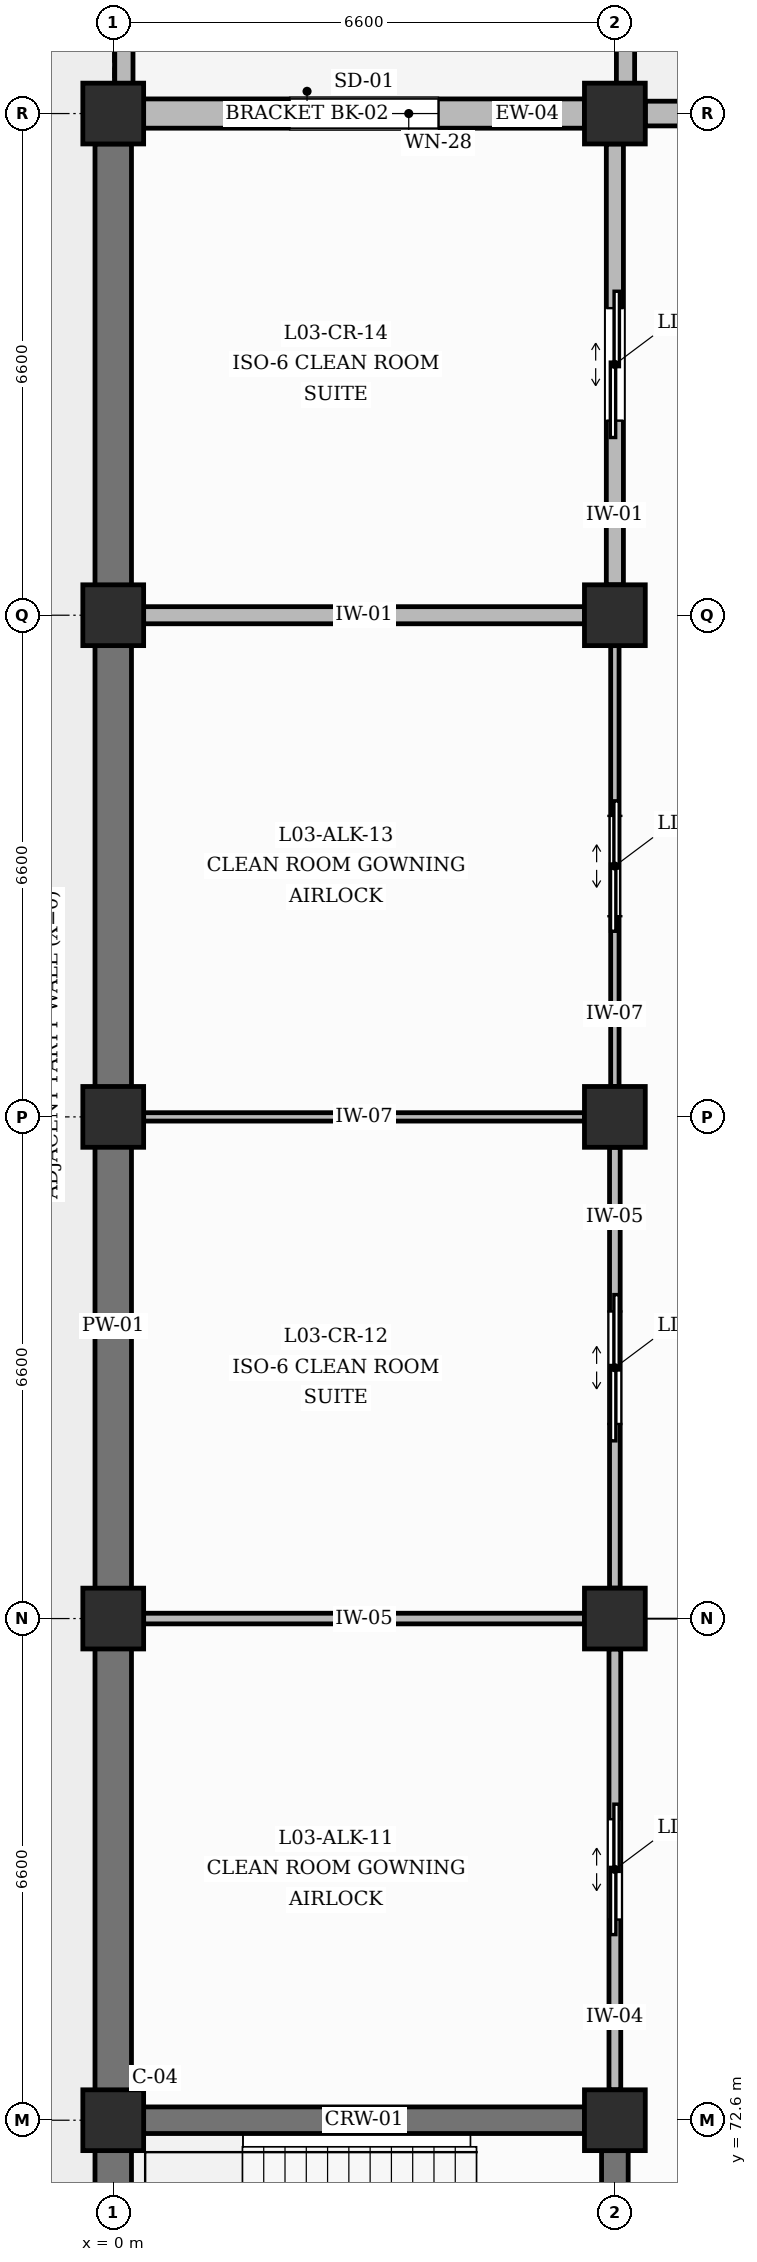
"""IFC4 building model, lengths in metres.
Left out: names, types, materials, properties, quantities, classifications, styles, units other than length and angle.
Written with IfcOpenShell. Run it as: python <this file> out.ifc"""

import sys

from ifc_helpers import new_model, si_unit, direction, frame, frame_2d, origin, origin_2d, place, context, subcontext, project, spatial, rectangle, extrude, element, fill, save


model = new_model("IFC4")
c1 = context("Model", 3, precision=1e-05, world=origin(), true_north=direction((0.0, 1.0)))
c2 = subcontext(c1, "Body", "Model", "MODEL_VIEW")
j1 = project(units=[si_unit("LENGTHUNIT", "METRE"), si_unit("PLANEANGLEUNIT", "RADIAN")], contexts=[c1])
p1 = place(None, origin())
s1 = spatial("IfcSite", under=j1, at=p1, CompositionType="ELEMENT")
p2 = place(p1, origin())
s2 = spatial("IfcBuilding", under=s1, at=p2, CompositionType="ELEMENT")
p3 = place(p2, frame((0.0, 0.0, 14.4)))
s3 = spatial("IfcBuildingStorey", under=s2, at=p3, CompositionType="ELEMENT", Elevation=14.4)
for number, where, z_axis, x_axis in (
    (1, (0.0, 72.6, 0.0), (0.0, 0.0, 1.0), (1.0, 0.0, 0.0)),
    (2, (0.0, 79.2, 0.0), (0.0, 0.0, 1.0), (1.0, 0.0, 0.0)),
    (3, (0.0, 85.8, 0.0), (0.0, 0.0, 1.0), (1.0, 0.0, 0.0)),
    (4, (0.0, 92.4, 0.0), (0.0, 0.0, 1.0), (1.0, 0.0, 0.0)),
    (5, (0.0, 99.0, 0.0), (0.0, 0.0, 1.0), (1.0, 0.0, 0.0)),
    (6, (6.6, 72.6, 0.0), (0.0, 0.0, 1.0), (1.0, 0.0, 0.0)),
    (7, (6.6, 79.2, 0.0), (0.0, 0.0, 1.0), (1.0, 0.0, 0.0)),
    (8, (6.6, 85.8, 0.0), (0.0, 0.0, 1.0), (1.0, 0.0, 0.0)),
    (9, (6.6, 92.4, 0.0), (0.0, 0.0, 1.0), (1.0, 0.0, 0.0)),
    (10, (6.6, 99.0, 0.0), (0.0, 0.0, 1.0), (1.0, 0.0, 0.0)),
):
    element("IfcColumn", number, at=place(p3, frame(where, z_axis=z_axis, x_axis=x_axis)), inside=s3, PredefinedType="COLUMN", context=c2, shape_type="SweptSolid", body=[
        extrude(rectangle(XDim=0.8, YDim=0.8, at=origin_2d()), origin(), (0.0, 0.0, 1.0), 4.2),
    ])
for number, where, z_axis, x_axis in (
    (11, (0.0, 66.4, 0.0), (0.0, 0.0, 1.0), (0.0, 1.0, 0.0)),
    (12, (0.0, 73.0, 0.0), (0.0, 0.0, 1.0), (0.0, 1.0, 0.0)),
):
    element("IfcWall", number, at=place(p3, frame(where, z_axis=z_axis, x_axis=x_axis)), inside=s3, PredefinedType="SOLIDWALL", context=c2, shape_type="SweptSolid", body=[
        extrude(rectangle(XDim=5.8, YDim=0.48, at=frame_2d((2.9, 0.0))), origin(), (0.0, 0.0, 1.0), 3.26),
    ])
p4 = place(p3, frame((0.0, 79.6, 0.0), z_axis=(0.0, 0.0, 1.0), x_axis=(0.0, 1.0, 0.0)))
e13 = element("IfcWall", 13, at=p4, inside=s3, PredefinedType="SOLIDWALL", context=c2, shape_type="SweptSolid", body=[
    extrude(rectangle(XDim=5.8, YDim=0.48, at=frame_2d((2.9, 0.0))), origin(), (0.0, 0.0, 1.0), 3.26),
])
p5 = place(p3, frame((0.0, 86.2, 0.0), z_axis=(0.0, 0.0, 1.0), x_axis=(0.0, 1.0, 0.0)))
e14 = element("IfcWall", 14, at=p5, inside=s3, PredefinedType="SOLIDWALL", context=c2, shape_type="SweptSolid", body=[
    extrude(rectangle(XDim=5.8, YDim=0.48, at=frame_2d((2.9, 0.0))), origin(), (0.0, 0.0, 1.0), 3.26),
])
p6 = place(p3, frame((0.4, 99.0, 0.0), z_axis=(0.0, 0.0, 1.0), x_axis=(1.0, 0.0, 0.0)))
e15 = element("IfcWall", 15, at=p6, inside=s3, PredefinedType="SOLIDWALL", context=c2, shape_type="SweptSolid", body=[
    extrude(rectangle(XDim=5.8, YDim=0.385, at=frame_2d((2.9, 0.0))), origin(), (0.0, 0.0, 1.0), 3.26),
])
p7 = place(p6, frame((1.92, 0.0, 0.95)))
e16 = element("IfcOpeningElement", 16, at=p7, cuts=e15, PredefinedType="OPENING", context=c2, shape_type="SweptSolid", body=[
    extrude(rectangle(XDim=1.96, YDim=1.96, at=frame_2d((0.98, 0.98))), frame((0.0, 0.202, 0.0), z_axis=(0.0, -1.0, 0.0), x_axis=(1.0, 0.0, 0.0)), (0.0, 0.0, 1.0), 0.405),
])
p8 = place(p3, frame((0.0, 92.8, 0.0), z_axis=(0.0, 0.0, 1.0), x_axis=(0.0, 1.0, 0.0)))
e17 = element("IfcWall", 17, at=p8, inside=s3, PredefinedType="SOLIDWALL", context=c2, shape_type="SweptSolid", body=[
    extrude(rectangle(XDim=5.8, YDim=0.48, at=frame_2d((2.9, 0.0))), origin(), (0.0, 0.0, 1.0), 3.26),
])
p9 = place(p3, frame((7.0, 99.0, 0.0), z_axis=(0.0, 0.0, 1.0), x_axis=(1.0, 0.0, 0.0)))
e18 = element("IfcWall", 18, at=p9, inside=s3, PredefinedType="SOLIDWALL", context=c2, shape_type="SweptSolid", body=[
    extrude(rectangle(XDim=5.8, YDim=0.325, at=frame_2d((2.9, 0.0))), origin(), (0.0, 0.0, 1.0), 3.26),
])
p10 = place(p9, frame((2.3, 0.0, 0.0)))
e19 = element("IfcOpeningElement", 19, at=p10, cuts=e18, PredefinedType="OPENING", context=c2, shape_type="SweptSolid", body=[
    extrude(rectangle(XDim=1.2, YDim=2.15, at=frame_2d((0.6, 1.075))), frame((0.0, 0.172, 0.0), z_axis=(0.0, -1.0, 0.0), x_axis=(1.0, 0.0, 0.0)), (0.0, 0.0, 1.0), 0.345),
])
for number, where, z_axis, x_axis in (
    (20, (6.74, 99.3, 0.0), (0.0, 0.0, 1.0), (0.0, 1.0, 0.0)),
    (21, (0.14, 99.3, 0.0), (0.0, 0.0, 1.0), (0.0, 1.0, 0.0)),
):
    element("IfcWall", number, at=place(p3, frame(where, z_axis=z_axis, x_axis=x_axis)), inside=s3, PredefinedType="PARAPET", context=c2, shape_type="SweptSolid", body=[
        extrude(rectangle(XDim=6.0, YDim=0.24, at=frame_2d((3.0, 0.0))), origin(), (0.0, 0.0, 1.0), 1.15),
    ])
p11 = place(p3, frame((0.4, 72.6, 0.0), z_axis=(0.0, 0.0, 1.0), x_axis=(1.0, 0.0, 0.0)))
e22 = element("IfcWall", 22, at=p11, inside=s3, PredefinedType="SHEAR", context=c2, shape_type="SweptSolid", body=[
    extrude(rectangle(XDim=5.8, YDim=0.35, at=frame_2d((2.9, 0.0))), origin(), (0.0, 0.0, 1.0), 3.16),
])
p12 = place(p3, frame((6.6, 66.4, 0.0), z_axis=(0.0, 0.0, 1.0), x_axis=(0.0, 1.0, 0.0)))
e23 = element("IfcWall", 23, at=p12, inside=s3, PredefinedType="SHEAR", context=c2, shape_type="SweptSolid", body=[
    extrude(rectangle(XDim=5.8, YDim=0.35, at=frame_2d((2.9, 0.0))), origin(), (0.0, 0.0, 1.0), 3.16),
])
p13 = place(p12, frame((2.35, 0.0, 0.0)))
e24 = element("IfcOpeningElement", 24, at=p13, cuts=e23, PredefinedType="OPENING", context=c2, shape_type="SweptSolid", body=[
    extrude(rectangle(XDim=1.1, YDim=2.15, at=frame_2d((0.55, 1.075))), frame((0.0, 0.185, 0.0), z_axis=(0.0, -1.0, 0.0), x_axis=(1.0, 0.0, 0.0)), (0.0, 0.0, 1.0), 0.37),
])
p14 = place(p3, frame((6.6, 73.0, 0.0), z_axis=(0.0, 0.0, 1.0), x_axis=(0.0, 1.0, 0.0)))
e25 = element("IfcWall", 25, at=p14, inside=s3, PredefinedType="PARTITIONING", context=c2, shape_type="SweptSolid", body=[
    extrude(rectangle(XDim=5.8, YDim=0.155, at=frame_2d((2.9, 0.0))), origin(), (0.0, 0.0, 1.0), 3.16),
])
p15 = place(p14, frame((2.24, 0.0, 0.0)))
e26 = element("IfcOpeningElement", 26, at=p15, cuts=e25, PredefinedType="OPENING", context=c2, shape_type="SweptSolid", body=[
    extrude(rectangle(XDim=1.32, YDim=2.2, at=frame_2d((0.66, 1.1))), frame((0.0, 0.087, 0.0), z_axis=(0.0, -1.0, 0.0), x_axis=(1.0, 0.0, 0.0)), (0.0, 0.0, 1.0), 0.175),
])
p16 = place(p3, frame((0.4, 79.2, 0.0), z_axis=(0.0, 0.0, 1.0), x_axis=(1.0, 0.0, 0.0)))
e27 = element("IfcWall", 27, at=p16, inside=s3, PredefinedType="PARTITIONING", context=c2, shape_type="SweptSolid", body=[
    extrude(rectangle(XDim=5.8, YDim=0.14, at=frame_2d((2.9, 0.0))), origin(), (0.0, 0.0, 1.0), 3.16),
])
p17 = place(p3, frame((6.6, 79.6, 0.0), z_axis=(0.0, 0.0, 1.0), x_axis=(0.0, 1.0, 0.0)))
e28 = element("IfcWall", 28, at=p17, inside=s3, PredefinedType="PARTITIONING", context=c2, shape_type="SweptSolid", body=[
    extrude(rectangle(XDim=5.8, YDim=0.14, at=frame_2d((2.9, 0.0))), origin(), (0.0, 0.0, 1.0), 3.16),
])
p18 = place(p17, frame((2.16, 0.0, 0.0)))
e29 = element("IfcOpeningElement", 29, at=p18, cuts=e28, PredefinedType="OPENING", context=c2, shape_type="SweptSolid", body=[
    extrude(rectangle(XDim=1.48, YDim=2.25, at=frame_2d((0.74, 1.125))), frame((0.0, 0.08, 0.0), z_axis=(0.0, -1.0, 0.0), x_axis=(1.0, 0.0, 0.0)), (0.0, 0.0, 1.0), 0.16),
])
p19 = place(p3, frame((0.4, 85.8, 0.0), z_axis=(0.0, 0.0, 1.0), x_axis=(1.0, 0.0, 0.0)))
e30 = element("IfcWall", 30, at=p19, inside=s3, PredefinedType="PARTITIONING", context=c2, shape_type="SweptSolid", body=[
    extrude(rectangle(XDim=5.8, YDim=0.11, at=frame_2d((2.9, 0.0))), origin(), (0.0, 0.0, 1.0), 3.16),
])
p20 = place(p3, frame((6.6, 86.2, 0.0), z_axis=(0.0, 0.0, 1.0), x_axis=(0.0, 1.0, 0.0)))
e31 = element("IfcWall", 31, at=p20, inside=s3, PredefinedType="PARTITIONING", context=c2, shape_type="SweptSolid", body=[
    extrude(rectangle(XDim=5.8, YDim=0.11, at=frame_2d((2.9, 0.0))), origin(), (0.0, 0.0, 1.0), 3.16),
])
p21 = place(p20, frame((2.24, 0.0, 0.0)))
e32 = element("IfcOpeningElement", 32, at=p21, cuts=e31, PredefinedType="OPENING", context=c2, shape_type="SweptSolid", body=[
    extrude(rectangle(XDim=1.32, YDim=2.2, at=frame_2d((0.66, 1.1))), frame((0.0, 0.065, 0.0), z_axis=(0.0, -1.0, 0.0), x_axis=(1.0, 0.0, 0.0)), (0.0, 0.0, 1.0), 0.13),
])
p22 = place(p3, frame((0.4, 92.4, 0.0), z_axis=(0.0, 0.0, 1.0), x_axis=(1.0, 0.0, 0.0)))
e33 = element("IfcWall", 33, at=p22, inside=s3, PredefinedType="PARTITIONING", context=c2, shape_type="SweptSolid", body=[
    extrude(rectangle(XDim=5.8, YDim=0.225, at=frame_2d((2.9, 0.0))), origin(), (0.0, 0.0, 1.0), 3.16),
])
p23 = place(p3, frame((6.6, 92.8, 0.0), z_axis=(0.0, 0.0, 1.0), x_axis=(0.0, 1.0, 0.0)))
e34 = element("IfcWall", 34, at=p23, inside=s3, PredefinedType="PARTITIONING", context=c2, shape_type="SweptSolid", body=[
    extrude(rectangle(XDim=5.8, YDim=0.225, at=frame_2d((2.9, 0.0))), origin(), (0.0, 0.0, 1.0), 3.16),
])
p24 = place(p23, frame((2.16, 0.0, 0.0)))
e35 = element("IfcOpeningElement", 35, at=p24, cuts=e34, PredefinedType="OPENING", context=c2, shape_type="SweptSolid", body=[
    extrude(rectangle(XDim=1.48, YDim=2.25, at=frame_2d((0.74, 1.125))), frame((0.0, 0.123, 0.0), z_axis=(0.0, -1.0, 0.0), x_axis=(1.0, 0.0, 0.0)), (0.0, 0.0, 1.0), 0.245),
])
p25 = place(p7, origin())
e36 = element("IfcWindow", 36, at=p25, inside=s3, PartitioningType="DOUBLE_PANEL_VERTICAL", PredefinedType="WINDOW", context=c2, shape_type="SweptSolid", body=[
    extrude(rectangle(XDim=1.96, YDim=1.96, at=frame_2d((0.98, 0.98))), frame((0.0, 0.03, 0.0), z_axis=(0.0, -1.0, 0.0), x_axis=(1.0, 0.0, 0.0)), (0.0, 0.0, 1.0), 0.06),
])
fill(e16, e36)
p26 = place(p15, origin())
e37 = element("IfcDoor", 37, at=p26, inside=s3, OperationType="DOUBLE_DOOR_SLIDING", PredefinedType="USERDEFINED", context=c2, shape_type="SweptSolid", body=[
    extrude(rectangle(XDim=1.32, YDim=2.2, at=frame_2d((0.66, 1.1))), frame((0.0, 0.025, 0.0), z_axis=(0.0, -1.0, 0.0), x_axis=(1.0, 0.0, 0.0)), (0.0, 0.0, 1.0), 0.05),
])
fill(e26, e37)
p27 = place(p18, origin())
e38 = element("IfcDoor", 38, at=p27, inside=s3, OperationType="DOUBLE_DOOR_SLIDING", PredefinedType="USERDEFINED", context=c2, shape_type="SweptSolid", body=[
    extrude(rectangle(XDim=1.48, YDim=2.25, at=frame_2d((0.74, 1.125))), frame((0.0, 0.025, 0.0), z_axis=(0.0, -1.0, 0.0), x_axis=(1.0, 0.0, 0.0)), (0.0, 0.0, 1.0), 0.05),
])
fill(e29, e38)
p28 = place(p21, origin())
e39 = element("IfcDoor", 39, at=p28, inside=s3, OperationType="DOUBLE_DOOR_SLIDING", PredefinedType="USERDEFINED", context=c2, shape_type="SweptSolid", body=[
    extrude(rectangle(XDim=1.32, YDim=2.2, at=frame_2d((0.66, 1.1))), frame((0.0, 0.025, 0.0), z_axis=(0.0, -1.0, 0.0), x_axis=(1.0, 0.0, 0.0)), (0.0, 0.0, 1.0), 0.05),
])
fill(e32, e39)
p29 = place(p24, origin())
e40 = element("IfcDoor", 40, at=p29, inside=s3, OperationType="DOUBLE_DOOR_SLIDING", PredefinedType="USERDEFINED", context=c2, shape_type="SweptSolid", body=[
    extrude(rectangle(XDim=1.48, YDim=2.25, at=frame_2d((0.74, 1.125))), frame((0.0, 0.025, 0.0), z_axis=(0.0, -1.0, 0.0), x_axis=(1.0, 0.0, 0.0)), (0.0, 0.0, 1.0), 0.05),
])
fill(e35, e40)
save(model, sys.argv[1])
